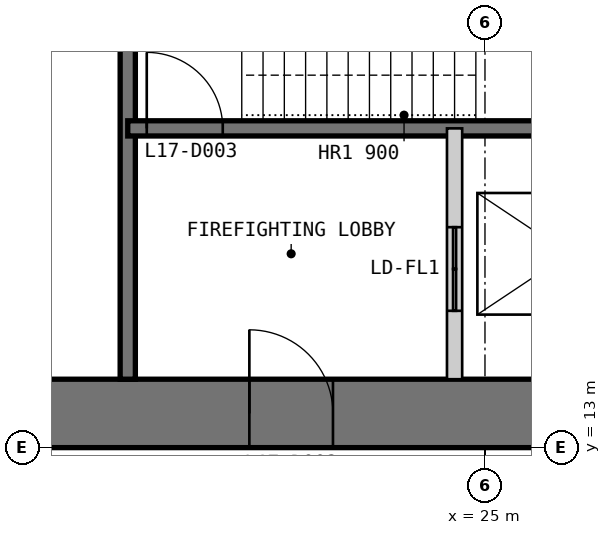
"""IFC4 building model, lengths in metres.
Left out: names, types, materials, properties, quantities, classifications, styles, units other than length and angle.
Written with IfcOpenShell. Run it as: python <this file> out.ifc"""

import sys

from ifc_helpers import new_model, si_unit, direction, frame, frame_2d, origin, place, context, subcontext, project, spatial, polyline, rectangle, outline, extrude, element, fill, save


model = new_model("IFC4")
c1 = context("Model", 3, precision=1e-05, world=origin(), true_north=direction((0.0, 1.0)))
c2 = subcontext(c1, "Body", "Model", "MODEL_VIEW")
j1 = project(units=[si_unit("LENGTHUNIT", "METRE"), si_unit("PLANEANGLEUNIT", "RADIAN")], contexts=[c1])
p1 = place(None, origin())
s1 = spatial("IfcSite", under=j1, at=p1, CompositionType="ELEMENT")
p2 = place(p1, origin())
s2 = spatial("IfcBuilding", under=s1, at=p2, CompositionType="ELEMENT")
p3 = place(p2, frame((0.0, 0.0, 75.0)))
s3 = spatial("IfcBuildingStorey", under=s2, at=p3, CompositionType="ELEMENT", Elevation=75.0)
p4 = place(p3, frame((13.0, 13.45, 0.0), z_axis=(0.0, 0.0, 1.0), x_axis=(1.0, 0.0, 0.0)))
e1 = element("IfcWall", 1, at=p4, inside=s3, PredefinedType="SHEAR", context=c2, shape_type="SweptSolid", body=[
    extrude(outline(polyline([(0.0, -0.45), (24.0, -0.45), (23.1, 0.45), (0.9, 0.45), (0.0, -0.45)])), origin(), (0.0, 0.0, 1.0), 4.0),
])
p5 = place(p4, frame((4.9, 0.0, 0.0)))
e2 = element("IfcOpeningElement", 2, at=p5, cuts=e1, PredefinedType="OPENING", context=c2, shape_type="SweptSolid", body=[
    extrude(rectangle(XDim=1.0, YDim=2.2, at=frame_2d((0.5, 1.1))), frame((0.0, 0.46, 0.0), z_axis=(0.0, -1.0, 0.0), x_axis=(1.0, 0.0, 0.0)), (0.0, 0.0, 1.0), 0.92),
])
p6 = place(p4, frame((8.9, 0.0, 0.0)))
e3 = element("IfcOpeningElement", 3, at=p6, cuts=e1, PredefinedType="OPENING", context=c2, shape_type="SweptSolid", body=[
    extrude(rectangle(XDim=1.1, YDim=2.2, at=frame_2d((0.55, 1.1))), frame((0.0, 0.46, 0.0), z_axis=(0.0, -1.0, 0.0), x_axis=(1.0, 0.0, 0.0)), (0.0, 0.0, 1.0), 0.92),
])
p7 = place(p4, frame((15.05, 0.0, 0.0)))
e4 = element("IfcOpeningElement", 4, at=p7, cuts=e1, PredefinedType="OPENING", context=c2, shape_type="SweptSolid", body=[
    extrude(rectangle(XDim=0.9, YDim=2.2, at=frame_2d((0.45, 1.1))), frame((0.0, 0.46, 0.0), z_axis=(0.0, -1.0, 0.0), x_axis=(1.0, 0.0, 0.0)), (0.0, 0.0, 1.0), 0.92),
])
p8 = place(p4, frame((17.9, 0.0, 0.0)))
e5 = element("IfcOpeningElement", 5, at=p8, cuts=e1, PredefinedType="OPENING", context=c2, shape_type="SweptSolid", body=[
    extrude(rectangle(XDim=1.0, YDim=2.2, at=frame_2d((0.5, 1.1))), frame((0.0, 0.46, 0.0), z_axis=(0.0, -1.0, 0.0), x_axis=(1.0, 0.0, 0.0)), (0.0, 0.0, 1.0), 0.92),
])
p9 = place(p4, frame((21.4, 0.0, 0.0)))
e6 = element("IfcOpeningElement", 6, at=p9, cuts=e1, PredefinedType="OPENING", context=c2, shape_type="SweptSolid", body=[
    extrude(rectangle(XDim=1.0, YDim=2.2, at=frame_2d((0.5, 1.1))), frame((0.0, 0.46, 0.0), z_axis=(0.0, -1.0, 0.0), x_axis=(1.0, 0.0, 0.0)), (0.0, 0.0, 1.0), 0.92),
])
p10 = place(p3, frame((20.3, 13.9, 0.0), z_axis=(0.0, 0.0, 1.0), x_axis=(0.0, 1.0, 0.0)))
e7 = element("IfcWall", 7, at=p10, inside=s3, PredefinedType="SOLIDWALL", context=c2, shape_type="SweptSolid", body=[
    extrude(rectangle(XDim=16.1, YDim=0.2, at=frame_2d((8.05, 0.0))), origin(), (0.0, 0.0, 1.0), 3.8),
])
p11 = place(p3, frame((20.3, 17.2, 0.0), z_axis=(0.0, 0.0, 1.0), x_axis=(1.0, 0.0, 0.0)))
e8 = element("IfcWall", 8, at=p11, inside=s3, PredefinedType="SOLIDWALL", context=c2, shape_type="SweptSolid", body=[
    extrude(rectangle(XDim=9.4, YDim=0.2, at=frame_2d((4.7, 0.0))), origin(), (0.0, 0.0, 1.0), 3.8),
])
p12 = place(p11, frame((0.25, 0.0, 0.0)))
e9 = element("IfcOpeningElement", 9, at=p12, cuts=e8, PredefinedType="OPENING", context=c2, shape_type="SweptSolid", body=[
    extrude(rectangle(XDim=1.0, YDim=2.2, at=frame_2d((0.5, 1.1))), frame((0.0, 0.11, 0.0), z_axis=(0.0, -1.0, 0.0), x_axis=(1.0, 0.0, 0.0)), (0.0, 0.0, 1.0), 0.22),
])
p13 = place(p3, frame((24.6, 13.9, 0.0), z_axis=(0.0, 0.0, 1.0), x_axis=(0.0, 1.0, 0.0)))
e10 = element("IfcWall", 10, at=p13, inside=s3, PredefinedType="PARTITIONING", context=c2, shape_type="SweptSolid", body=[
    extrude(rectangle(XDim=3.3, YDim=0.2, at=frame_2d((1.65, 0.0))), origin(), (0.0, 0.0, 1.0), 3.8),
])
p14 = place(p13, frame((0.9, 0.0, 0.0)))
e11 = element("IfcOpeningElement", 11, at=p14, cuts=e10, PredefinedType="OPENING", context=c2, shape_type="SweptSolid", body=[
    extrude(rectangle(XDim=1.1, YDim=2.2, at=frame_2d((0.55, 1.1))), frame((0.0, 0.11, 0.0), z_axis=(0.0, -1.0, 0.0), x_axis=(1.0, 0.0, 0.0)), (0.0, 0.0, 1.0), 0.22),
])
p15 = place(p6, origin())
e12 = element("IfcDoor", 12, at=p15, inside=s3, OperationType="SINGLE_SWING_LEFT", PredefinedType="DOOR", context=c2, shape_type="SweptSolid", body=[
    extrude(rectangle(XDim=1.1, YDim=2.2, at=frame_2d((0.55, 1.1))), frame((0.0, 0.025, 0.0), z_axis=(0.0, -1.0, 0.0), x_axis=(1.0, 0.0, 0.0)), (0.0, 0.0, 1.0), 0.05),
    extrude(outline(polyline([(0.0, 0.0), (0.04, 0.0), (0.04, 2.16), (1.06, 2.16), (1.06, 0.0), (1.1, 0.0), (1.1, 2.2), (0.0, 2.2), (0.0, 0.0)])), frame((0.0, 0.3, 0.0), z_axis=(0.0, -1.0, 0.0), x_axis=(1.0, 0.0, 0.0)), (0.0, 0.0, 1.0), 0.6),
])
fill(e3, e12)
p16 = place(p12, origin())
e13 = element("IfcDoor", 13, at=p16, inside=s3, OperationType="SINGLE_SWING_LEFT", PredefinedType="DOOR", context=c2, shape_type="SweptSolid", body=[
    extrude(rectangle(XDim=1.0, YDim=2.2, at=frame_2d((0.5, 1.1))), frame((0.0, 0.025, 0.0), z_axis=(0.0, -1.0, 0.0), x_axis=(1.0, 0.0, 0.0)), (0.0, 0.0, 1.0), 0.05),
])
fill(e9, e13)
p17 = place(p14, origin())
e14 = element("IfcDoor", 14, at=p17, inside=s3, OperationType="DOUBLE_DOOR_SLIDING", PredefinedType="DOOR", context=c2, shape_type="SweptSolid", body=[
    extrude(rectangle(XDim=1.1, YDim=2.2, at=frame_2d((0.55, 1.1))), frame((0.0, 0.025, 0.0), z_axis=(0.0, -1.0, 0.0), x_axis=(1.0, 0.0, 0.0)), (0.0, 0.0, 1.0), 0.05),
])
fill(e11, e14)
save(model, sys.argv[1])
